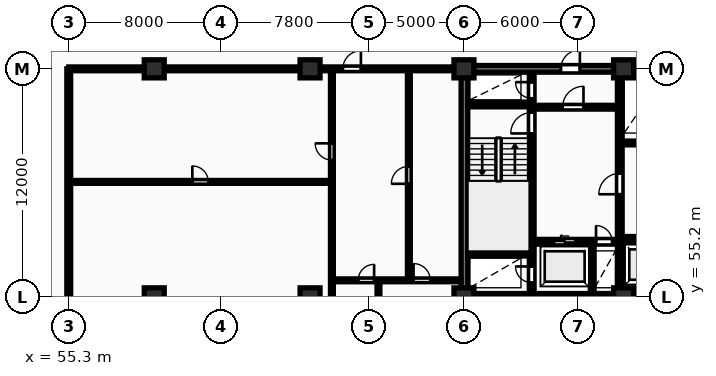
"""IFC4 building model, lengths in metres.
Left out: names, types, materials, properties, quantities, classifications, styles, units other than length and angle.
Written with IfcOpenShell. Run it as: python <this file> out.ifc"""

import sys

from ifc_helpers import new_model, si_unit, direction, frame, frame_2d, origin, origin_2d, place, context, subcontext, project, spatial, rectangle, extrude, element, fill, save


model = new_model("IFC4")
c1 = context("Model", 3, precision=1e-05, world=origin(), true_north=direction((0.0, 1.0)))
c2 = subcontext(c1, "Body", "Model", "MODEL_VIEW")
j1 = project(units=[si_unit("LENGTHUNIT", "METRE"), si_unit("PLANEANGLEUNIT", "RADIAN")], contexts=[c1])
p1 = place(None, origin())
s1 = spatial("IfcSite", under=j1, at=p1, CompositionType="ELEMENT")
p2 = place(p1, origin())
s2 = spatial("IfcBuilding", under=s1, at=p2, CompositionType="ELEMENT")
p3 = place(p2, frame((0.0, 0.0, 24.0)))
s3 = spatial("IfcBuildingStorey", under=s2, at=p3, CompositionType="ELEMENT", Elevation=24.0)
for number, where, z_axis, x_axis in (
    (1, (59.8, 55.2, 0.0), (0.0, 0.0, 1.0), (1.0, 0.0, 0.0)),
    (2, (59.8, 67.2, 0.0), (0.0, 0.0, 1.0), (1.0, 0.0, 0.0)),
    (3, (68.0, 55.2, 0.0), (0.0, 0.0, 1.0), (1.0, 0.0, 0.0)),
    (4, (68.0, 67.2, 0.0), (0.0, 0.0, 1.0), (1.0, 0.0, 0.0)),
    (5, (76.1, 55.2, 0.0), (0.0, 0.0, 1.0), (1.0, 0.0, 0.0)),
    (6, (76.1, 67.2, 0.0), (0.0, 0.0, 1.0), (1.0, 0.0, 0.0)),
    (7, (84.5, 55.2, 0.0), (0.0, 0.0, 1.0), (1.0, 0.0, 0.0)),
    (8, (84.5, 67.2, 0.0), (0.0, 0.0, 1.0), (1.0, 0.0, 0.0)),
):
    element("IfcColumn", number, at=place(p3, frame(where, z_axis=z_axis, x_axis=x_axis)), inside=s3, PredefinedType="COLUMN", context=c2, shape_type="SweptSolid", body=[
        extrude(rectangle(XDim=1.05, YDim=0.95, at=origin_2d()), origin(), (0.0, 0.0, 1.0), 3.25),
    ])
p4 = place(p3, frame((75.95, 55.2, 0.0), z_axis=(0.0, 0.0, 1.0), x_axis=(1.0, 0.0, 0.0)))
e9 = element("IfcWall", 9, at=p4, inside=s3, PredefinedType="SHEAR", context=c2, shape_type="SweptSolid", body=[
    extrude(rectangle(XDim=36.3, YDim=0.35, at=frame_2d((18.15, 0.0))), origin(), (0.0, 0.0, 1.0), 3.25),
])
p5 = place(p3, frame((76.125, 55.375, 0.0), z_axis=(0.0, 0.0, 1.0), x_axis=(0.0, 1.0, 0.0)))
e10 = element("IfcWall", 10, at=p5, inside=s3, PredefinedType="SHEAR", context=c2, shape_type="SweptSolid", body=[
    extrude(rectangle(XDim=11.65, YDim=0.35, at=frame_2d((5.825, 0.0))), origin(), (0.0, 0.0, 1.0), 3.25),
])
p6 = place(p3, frame((75.95, 67.2, 0.0), z_axis=(0.0, 0.0, 1.0), x_axis=(1.0, 0.0, 0.0)))
e11 = element("IfcWall", 11, at=p6, inside=s3, PredefinedType="SHEAR", context=c2, shape_type="SweptSolid", body=[
    extrude(rectangle(XDim=36.3, YDim=0.35, at=frame_2d((18.15, 0.0))), origin(), (0.0, 0.0, 1.0), 3.25),
])
p7 = place(p6, frame((5.25, 0.0, 0.0)))
e12 = element("IfcOpeningElement", 12, at=p7, cuts=e11, PredefinedType="OPENING", context=c2, shape_type="SweptSolid", body=[
    extrude(rectangle(XDim=1.0, YDim=2.15, at=frame_2d((0.5, 1.075))), frame((0.0, 0.185, 0.0), z_axis=(0.0, -1.0, 0.0), x_axis=(1.0, 0.0, 0.0)), (0.0, 0.0, 1.0), 0.37),
])
p8 = place(p6, frame((21.6, 0.0, 0.0)))
e13 = element("IfcOpeningElement", 13, at=p8, cuts=e11, PredefinedType="OPENING", context=c2, shape_type="SweptSolid", body=[
    extrude(rectangle(XDim=1.5, YDim=2.2, at=frame_2d((0.75, 1.1))), frame((0.0, 0.185, 0.0), z_axis=(0.0, -1.0, 0.0), x_axis=(1.0, 0.0, 0.0)), (0.0, 0.0, 1.0), 0.37),
])
p9 = place(p6, frame((30.45, 0.0, 0.0)))
e14 = element("IfcOpeningElement", 14, at=p9, cuts=e11, PredefinedType="OPENING", context=c2, shape_type="SweptSolid", body=[
    extrude(rectangle(XDim=1.0, YDim=2.15, at=frame_2d((0.5, 1.075))), frame((0.0, 0.185, 0.0), z_axis=(0.0, -1.0, 0.0), x_axis=(1.0, 0.0, 0.0)), (0.0, 0.0, 1.0), 0.37),
])
p10 = place(p3, frame((79.665, 55.4, 0.0), z_axis=(0.0, 0.0, 1.0), x_axis=(0.0, 1.0, 0.0)))
e15 = element("IfcWall", 15, at=p10, inside=s3, PredefinedType="SHEAR", context=c2, shape_type="SweptSolid", body=[
    extrude(rectangle(XDim=11.6, YDim=0.25, at=frame_2d((5.8, 0.0))), origin(), (0.0, 0.0, 1.0), 3.25),
])
p11 = place(p10, frame((0.55, 0.0, 0.0)))
e16 = element("IfcOpeningElement", 16, at=p11, cuts=e15, PredefinedType="OPENING", context=c2, shape_type="SweptSolid", body=[
    extrude(rectangle(XDim=0.85, YDim=2.05, at=frame_2d((0.425, 1.025))), frame((0.0, 0.135, 0.0), z_axis=(0.0, -1.0, 0.0), x_axis=(1.0, 0.0, 0.0)), (0.0, 0.0, 1.0), 0.27),
])
p12 = place(p10, frame((8.4, 0.0, 0.0)))
e17 = element("IfcOpeningElement", 17, at=p12, cuts=e15, PredefinedType="OPENING", context=c2, shape_type="SweptSolid", body=[
    extrude(rectangle(XDim=1.1, YDim=2.1, at=frame_2d((0.55, 1.05))), frame((0.0, 0.135, 0.0), z_axis=(0.0, -1.0, 0.0), x_axis=(1.0, 0.0, 0.0)), (0.0, 0.0, 1.0), 0.27),
])
p13 = place(p10, frame((10.25, 0.0, 0.0)))
e18 = element("IfcOpeningElement", 18, at=p13, cuts=e15, PredefinedType="OPENING", context=c2, shape_type="SweptSolid", body=[
    extrude(rectangle(XDim=0.85, YDim=2.05, at=frame_2d((0.425, 1.025))), frame((0.0, 0.135, 0.0), z_axis=(0.0, -1.0, 0.0), x_axis=(1.0, 0.0, 0.0)), (0.0, 0.0, 1.0), 0.27),
])
for number, where, z_axis, x_axis in (
    (19, (76.3, 57.475, 0.0), (0.0, 0.0, 1.0), (1.0, 0.0, 0.0)),
    (20, (76.3, 65.325, 0.0), (0.0, 0.0, 1.0), (1.0, 0.0, 0.0)),
):
    element("IfcWall", number, at=place(p3, frame(where, z_axis=z_axis, x_axis=x_axis)), inside=s3, PredefinedType="SHEAR", context=c2, shape_type="SweptSolid", body=[
        extrude(rectangle(XDim=3.24, YDim=0.25, at=frame_2d((1.62, 0.0))), origin(), (0.0, 0.0, 1.0), 3.25),
    ])
p14 = place(p3, frame((79.79, 58.1, 0.0), z_axis=(0.0, 0.0, 1.0), x_axis=(1.0, 0.0, 0.0)))
e21 = element("IfcWall", 21, at=p14, inside=s3, PredefinedType="SHEAR", context=c2, shape_type="SweptSolid", body=[
    extrude(rectangle(XDim=4.39, YDim=0.25, at=frame_2d((2.195, 0.0))), origin(), (0.0, 0.0, 1.0), 3.25),
])
p15 = place(p14, frame((1.05, 0.0, 0.0)))
e22 = element("IfcOpeningElement", 22, at=p15, cuts=e21, PredefinedType="OPENING", context=c2, shape_type="SweptSolid", body=[
    extrude(rectangle(XDim=1.12, YDim=2.12, at=frame_2d((0.56, 1.06))), frame((0.0, 0.135, 0.0), z_axis=(0.0, -1.0, 0.0), x_axis=(1.0, 0.0, 0.0)), (0.0, 0.0, 1.0), 0.27),
])
p16 = place(p14, frame((3.26, 0.0, 0.0)))
e23 = element("IfcOpeningElement", 23, at=p16, cuts=e21, PredefinedType="OPENING", context=c2, shape_type="SweptSolid", body=[
    extrude(rectangle(XDim=0.85, YDim=2.05, at=frame_2d((0.425, 1.025))), frame((0.0, 0.135, 0.0), z_axis=(0.0, -1.0, 0.0), x_axis=(1.0, 0.0, 0.0)), (0.0, 0.0, 1.0), 0.27),
])
p17 = place(p3, frame((82.85, 55.4, 0.0), z_axis=(0.0, 0.0, 1.0), x_axis=(0.0, 1.0, 0.0)))
e24 = element("IfcWall", 24, at=p17, inside=s3, PredefinedType="PARTITIONING", context=c2, shape_type="SweptSolid", body=[
    extrude(rectangle(XDim=2.56, YDim=0.2, at=frame_2d((1.28, 0.0))), origin(), (0.0, 0.0, 1.0), 2.97),
])
p18 = place(p3, frame((79.79, 65.18, 0.0), z_axis=(0.0, 0.0, 1.0), x_axis=(1.0, 0.0, 0.0)))
e25 = element("IfcWall", 25, at=p18, inside=s3, PredefinedType="PARTITIONING", context=c2, shape_type="SweptSolid", body=[
    extrude(rectangle(XDim=4.39, YDim=0.2, at=frame_2d((2.195, 0.0))), origin(), (0.0, 0.0, 1.0), 2.97),
])
p19 = place(p18, frame((1.5, 0.0, 0.0)))
e26 = element("IfcOpeningElement", 26, at=p19, cuts=e25, PredefinedType="OPENING", context=c2, shape_type="SweptSolid", body=[
    extrude(rectangle(XDim=1.1, YDim=2.1, at=frame_2d((0.55, 1.05))), frame((0.0, 0.11, 0.0), z_axis=(0.0, -1.0, 0.0), x_axis=(1.0, 0.0, 0.0)), (0.0, 0.0, 1.0), 0.22),
])
p20 = place(p3, frame((84.3, 55.4, 0.0), z_axis=(0.0, 0.0, 1.0), x_axis=(0.0, 1.0, 0.0)))
e27 = element("IfcWall", 27, at=p20, inside=s3, PredefinedType="SHEAR", context=c2, shape_type="SweptSolid", body=[
    extrude(rectangle(XDim=11.6, YDim=0.25, at=frame_2d((5.8, 0.0))), origin(), (0.0, 0.0, 1.0), 3.25),
])
p21 = place(p20, frame((5.2, 0.0, 0.0)))
e28 = element("IfcOpeningElement", 28, at=p21, cuts=e27, PredefinedType="OPENING", context=c2, shape_type="SweptSolid", body=[
    extrude(rectangle(XDim=1.1, YDim=2.1, at=frame_2d((0.55, 1.05))), frame((0.0, 0.135, 0.0), z_axis=(0.0, -1.0, 0.0), x_axis=(1.0, 0.0, 0.0)), (0.0, 0.0, 1.0), 0.27),
])
p22 = place(p3, frame((84.42, 58.25, 0.0), z_axis=(0.0, 0.0, 1.0), x_axis=(1.0, 0.0, 0.0)))
e29 = element("IfcWall", 29, at=p22, inside=s3, PredefinedType="SHEAR", context=c2, shape_type="SweptSolid", body=[
    extrude(rectangle(XDim=8.36, YDim=0.25, at=frame_2d((4.18, 0.0))), origin(), (0.0, 0.0, 1.0), 3.25),
])
p23 = place(p22, frame((0.82, 0.0, 0.0)))
e30 = element("IfcOpeningElement", 30, at=p23, cuts=e29, PredefinedType="OPENING", context=c2, shape_type="SweptSolid", body=[
    extrude(rectangle(XDim=1.12, YDim=2.12, at=frame_2d((0.56, 1.06))), frame((0.0, 0.135, 0.0), z_axis=(0.0, -1.0, 0.0), x_axis=(1.0, 0.0, 0.0)), (0.0, 0.0, 1.0), 0.27),
])
p24 = place(p22, frame((3.62, 0.0, 0.0)))
e31 = element("IfcOpeningElement", 31, at=p24, cuts=e29, PredefinedType="OPENING", context=c2, shape_type="SweptSolid", body=[
    extrude(rectangle(XDim=1.12, YDim=2.12, at=frame_2d((0.56, 1.06))), frame((0.0, 0.135, 0.0), z_axis=(0.0, -1.0, 0.0), x_axis=(1.0, 0.0, 0.0)), (0.0, 0.0, 1.0), 0.27),
])
p25 = place(p22, frame((6.42, 0.0, 0.0)))
e32 = element("IfcOpeningElement", 32, at=p25, cuts=e29, PredefinedType="OPENING", context=c2, shape_type="SweptSolid", body=[
    extrude(rectangle(XDim=1.12, YDim=2.12, at=frame_2d((0.56, 1.06))), frame((0.0, 0.135, 0.0), z_axis=(0.0, -1.0, 0.0), x_axis=(1.0, 0.0, 0.0)), (0.0, 0.0, 1.0), 0.27),
])
p26 = place(p3, frame((84.42, 63.3, 0.0), z_axis=(0.0, 0.0, 1.0), x_axis=(1.0, 0.0, 0.0)))
e33 = element("IfcWall", 33, at=p26, inside=s3, PredefinedType="PARTITIONING", context=c2, shape_type="SweptSolid", body=[
    extrude(rectangle(XDim=19.83, YDim=0.2, at=frame_2d((9.915, 0.0))), origin(), (0.0, 0.0, 1.0), 2.97),
])
p27 = place(p26, frame((1.15, 0.0, 0.0)))
e34 = element("IfcOpeningElement", 34, at=p27, cuts=e33, PredefinedType="OPENING", context=c2, shape_type="SweptSolid", body=[
    extrude(rectangle(XDim=0.85, YDim=2.05, at=frame_2d((0.425, 1.025))), frame((0.0, 0.11, 0.0), z_axis=(0.0, -1.0, 0.0), x_axis=(1.0, 0.0, 0.0)), (0.0, 0.0, 1.0), 0.22),
])
p28 = place(p26, frame((3.25, 0.0, 0.0)))
e35 = element("IfcOpeningElement", 35, at=p28, cuts=e33, PredefinedType="OPENING", context=c2, shape_type="SweptSolid", body=[
    extrude(rectangle(XDim=0.85, YDim=2.05, at=frame_2d((0.425, 1.025))), frame((0.0, 0.11, 0.0), z_axis=(0.0, -1.0, 0.0), x_axis=(1.0, 0.0, 0.0)), (0.0, 0.0, 1.0), 0.22),
])
p29 = place(p26, frame((13.08, 0.0, 0.0)))
e36 = element("IfcOpeningElement", 36, at=p29, cuts=e33, PredefinedType="OPENING", context=c2, shape_type="SweptSolid", body=[
    extrude(rectangle(XDim=1.5, YDim=2.2, at=frame_2d((0.75, 1.1))), frame((0.0, 0.11, 0.0), z_axis=(0.0, -1.0, 0.0), x_axis=(1.0, 0.0, 0.0)), (0.0, 0.0, 1.0), 0.22),
])
p30 = place(p26, frame((6.68, 0.0, 0.0)))
e37 = element("IfcOpeningElement", 37, at=p30, cuts=e33, PredefinedType="OPENING", context=c2, shape_type="SweptSolid", body=[
    extrude(rectangle(XDim=0.92, YDim=2.08, at=frame_2d((0.46, 1.04))), frame((0.0, 0.11, 0.0), z_axis=(0.0, -1.0, 0.0), x_axis=(1.0, 0.0, 0.0)), (0.0, 0.0, 1.0), 0.22),
])
p31 = place(p26, frame((16.33, 0.0, 0.0)))
e38 = element("IfcOpeningElement", 38, at=p31, cuts=e33, PredefinedType="OPENING", context=c2, shape_type="SweptSolid", body=[
    extrude(rectangle(XDim=0.88, YDim=2.06, at=frame_2d((0.44, 1.03))), frame((0.0, 0.11, 0.0), z_axis=(0.0, -1.0, 0.0), x_axis=(1.0, 0.0, 0.0)), (0.0, 0.0, 1.0), 0.22),
])
p32 = place(p3, frame((55.3, 51.1, 0.0), z_axis=(0.0, 0.0, 1.0), x_axis=(0.0, 1.0, 0.0)))
e39 = element("IfcWall", 39, at=p32, inside=s3, PredefinedType="PARTITIONING", context=c2, shape_type="SweptSolid", body=[
    extrude(rectangle(XDim=16.1, YDim=0.2, at=frame_2d((8.05, 0.0))), origin(), (0.0, 0.0, 1.0), 2.97),
])
p33 = place(p3, frame((55.3, 61.25, 0.0), z_axis=(0.0, 0.0, 1.0), x_axis=(1.0, 0.0, 0.0)))
e40 = element("IfcWall", 40, at=p33, inside=s3, PredefinedType="PARTITIONING", context=c2, shape_type="SweptSolid", body=[
    extrude(rectangle(XDim=13.85, YDim=0.15, at=frame_2d((6.925, 0.0))), origin(), (0.0, 0.0, 1.0), 2.97),
])
p34 = place(p33, frame((6.505, 0.0, 0.0)))
e41 = element("IfcOpeningElement", 41, at=p34, cuts=e40, PredefinedType="OPENING", context=c2, shape_type="SweptSolid", body=[
    extrude(rectangle(XDim=0.84, YDim=2.04, at=frame_2d((0.42, 1.02))), frame((0.0, 0.085, 0.0), z_axis=(0.0, -1.0, 0.0), x_axis=(1.0, 0.0, 0.0)), (0.0, 0.0, 1.0), 0.17),
])
p35 = place(p3, frame((69.15, 51.1, 0.0), z_axis=(0.0, 0.0, 1.0), x_axis=(0.0, 1.0, 0.0)))
e42 = element("IfcWall", 42, at=p35, inside=s3, PredefinedType="PARTITIONING", context=c2, shape_type="SweptSolid", body=[
    extrude(rectangle(XDim=16.05, YDim=0.15, at=frame_2d((8.025, 0.0))), origin(), (0.0, 0.0, 1.0), 2.97),
])
p36 = place(p35, frame((11.3, 0.0, 0.0)))
e43 = element("IfcOpeningElement", 43, at=p36, cuts=e42, PredefinedType="OPENING", context=c2, shape_type="SweptSolid", body=[
    extrude(rectangle(XDim=0.88, YDim=2.06, at=frame_2d((0.44, 1.03))), frame((0.0, 0.085, 0.0), z_axis=(0.0, -1.0, 0.0), x_axis=(1.0, 0.0, 0.0)), (0.0, 0.0, 1.0), 0.17),
])
p37 = place(p3, frame((73.2, 56.07, 0.0), z_axis=(0.0, 0.0, 1.0), x_axis=(0.0, 1.0, 0.0)))
e44 = element("IfcWall", 44, at=p37, inside=s3, PredefinedType="PARTITIONING", context=c2, shape_type="SweptSolid", body=[
    extrude(rectangle(XDim=11.08, YDim=0.15, at=frame_2d((5.54, 0.0))), origin(), (0.0, 0.0, 1.0), 2.97),
])
p38 = place(p37, frame((5.08, 0.0, 0.0)))
e45 = element("IfcOpeningElement", 45, at=p38, cuts=e44, PredefinedType="OPENING", context=c2, shape_type="SweptSolid", body=[
    extrude(rectangle(XDim=0.92, YDim=2.08, at=frame_2d((0.46, 1.04))), frame((0.0, 0.085, 0.0), z_axis=(0.0, -1.0, 0.0), x_axis=(1.0, 0.0, 0.0)), (0.0, 0.0, 1.0), 0.17),
])
p39 = place(p3, frame((71.6, 51.1, 0.0), z_axis=(0.0, 0.0, 1.0), x_axis=(0.0, 1.0, 0.0)))
e46 = element("IfcWall", 46, at=p39, inside=s3, PredefinedType="PARTITIONING", context=c2, shape_type="SweptSolid", body=[
    extrude(rectangle(XDim=4.97, YDim=0.15, at=frame_2d((2.485, 0.0))), origin(), (0.0, 0.0, 1.0), 2.97),
])
p40 = place(p3, frame((69.17, 56.07, 0.0), z_axis=(0.0, 0.0, 1.0), x_axis=(1.0, 0.0, 0.0)))
e47 = element("IfcWall", 47, at=p40, inside=s3, PredefinedType="PARTITIONING", context=c2, shape_type="SweptSolid", body=[
    extrude(rectangle(XDim=6.76, YDim=0.15, at=frame_2d((3.38, 0.0))), origin(), (0.0, 0.0, 1.0), 2.97),
])
p41 = place(p40, frame((1.362, 0.0, 0.0)))
e48 = element("IfcOpeningElement", 48, at=p41, cuts=e47, PredefinedType="OPENING", context=c2, shape_type="SweptSolid", body=[
    extrude(rectangle(XDim=0.84, YDim=2.04, at=frame_2d((0.42, 1.02))), frame((0.0, 0.085, 0.0), z_axis=(0.0, -1.0, 0.0), x_axis=(1.0, 0.0, 0.0)), (0.0, 0.0, 1.0), 0.17),
])
p42 = place(p40, frame((4.277, 0.0, 0.0)))
e49 = element("IfcOpeningElement", 49, at=p42, cuts=e47, PredefinedType="OPENING", context=c2, shape_type="SweptSolid", body=[
    extrude(rectangle(XDim=0.88, YDim=2.06, at=frame_2d((0.44, 1.03))), frame((0.0, 0.085, 0.0), z_axis=(0.0, -1.0, 0.0), x_axis=(1.0, 0.0, 0.0)), (0.0, 0.0, 1.0), 0.17),
])
p43 = place(p3, frame((55.3, 67.2, 0.0), z_axis=(0.0, 0.0, 1.0), x_axis=(1.0, 0.0, 0.0)))
e50 = element("IfcWall", 50, at=p43, inside=s3, PredefinedType="PARTITIONING", context=c2, shape_type="SweptSolid", body=[
    extrude(rectangle(XDim=20.65, YDim=0.2, at=frame_2d((10.325, 0.0))), origin(), (0.0, 0.0, 1.0), 2.37),
])
p44 = place(p43, frame((14.426, 0.0, 0.0)))
e51 = element("IfcOpeningElement", 51, at=p44, cuts=e50, PredefinedType="OPENING", context=c2, shape_type="SweptSolid", body=[
    extrude(rectangle(XDim=0.95, YDim=2.15, at=frame_2d((0.475, 1.075))), frame((0.0, 0.11, 0.0), z_axis=(0.0, -1.0, 0.0), x_axis=(1.0, 0.0, 0.0)), (0.0, 0.0, 1.0), 0.22),
])
p45 = place(p7, origin())
e52 = element("IfcDoor", 52, at=p45, inside=s3, OperationType="SINGLE_SWING_RIGHT", PredefinedType="DOOR", context=c2, shape_type="SweptSolid", body=[
    extrude(rectangle(XDim=1.0, YDim=2.15, at=frame_2d((0.5, 1.075))), frame((0.0, 0.025, 0.0), z_axis=(0.0, -1.0, 0.0), x_axis=(1.0, 0.0, 0.0)), (0.0, 0.0, 1.0), 0.05),
])
fill(e12, e52)
p46 = place(p11, origin())
e53 = element("IfcDoor", 53, at=p46, inside=s3, OperationType="SINGLE_SWING_RIGHT", PredefinedType="DOOR", context=c2, shape_type="SweptSolid", body=[
    extrude(rectangle(XDim=0.85, YDim=2.05, at=frame_2d((0.425, 1.025))), frame((0.0, 0.025, 0.0), z_axis=(0.0, -1.0, 0.0), x_axis=(1.0, 0.0, 0.0)), (0.0, 0.0, 1.0), 0.05),
])
fill(e16, e53)
p47 = place(p12, origin())
e54 = element("IfcDoor", 54, at=p47, inside=s3, OperationType="SINGLE_SWING_LEFT", PredefinedType="DOOR", context=c2, shape_type="SweptSolid", body=[
    extrude(rectangle(XDim=1.1, YDim=2.1, at=frame_2d((0.55, 1.05))), frame((0.0, 0.025, 0.0), z_axis=(0.0, -1.0, 0.0), x_axis=(1.0, 0.0, 0.0)), (0.0, 0.0, 1.0), 0.05),
])
fill(e17, e54)
p48 = place(p13, origin())
e55 = element("IfcDoor", 55, at=p48, inside=s3, OperationType="SINGLE_SWING_RIGHT", PredefinedType="DOOR", context=c2, shape_type="SweptSolid", body=[
    extrude(rectangle(XDim=0.85, YDim=2.05, at=frame_2d((0.425, 1.025))), frame((0.0, 0.025, 0.0), z_axis=(0.0, -1.0, 0.0), x_axis=(1.0, 0.0, 0.0)), (0.0, 0.0, 1.0), 0.05),
])
fill(e18, e55)
p49 = place(p15, origin())
e56 = element("IfcDoor", 56, at=p49, inside=s3, OperationType="SLIDING_TO_LEFT", PredefinedType="DOOR", context=c2, shape_type="SweptSolid", body=[
    extrude(rectangle(XDim=1.12, YDim=2.12, at=frame_2d((0.56, 1.06))), frame((0.0, 0.025, 0.0), z_axis=(0.0, -1.0, 0.0), x_axis=(1.0, 0.0, 0.0)), (0.0, 0.0, 1.0), 0.05),
])
fill(e22, e56)
p50 = place(p16, origin())
e57 = element("IfcDoor", 57, at=p50, inside=s3, OperationType="SINGLE_SWING_LEFT", PredefinedType="DOOR", context=c2, shape_type="SweptSolid", body=[
    extrude(rectangle(XDim=0.85, YDim=2.05, at=frame_2d((0.425, 1.025))), frame((0.0, 0.025, 0.0), z_axis=(0.0, -1.0, 0.0), x_axis=(1.0, 0.0, 0.0)), (0.0, 0.0, 1.0), 0.05),
])
fill(e23, e57)
p51 = place(p19, origin())
e58 = element("IfcDoor", 58, at=p51, inside=s3, OperationType="SINGLE_SWING_RIGHT", PredefinedType="DOOR", context=c2, shape_type="SweptSolid", body=[
    extrude(rectangle(XDim=1.1, YDim=2.1, at=frame_2d((0.55, 1.05))), frame((0.0, 0.025, 0.0), z_axis=(0.0, -1.0, 0.0), x_axis=(1.0, 0.0, 0.0)), (0.0, 0.0, 1.0), 0.05),
])
fill(e26, e58)
p52 = place(p21, origin())
e59 = element("IfcDoor", 59, at=p52, inside=s3, OperationType="SINGLE_SWING_LEFT", PredefinedType="DOOR", context=c2, shape_type="SweptSolid", body=[
    extrude(rectangle(XDim=1.1, YDim=2.1, at=frame_2d((0.55, 1.05))), frame((0.0, 0.025, 0.0), z_axis=(0.0, -1.0, 0.0), x_axis=(1.0, 0.0, 0.0)), (0.0, 0.0, 1.0), 0.05),
])
fill(e28, e59)
p53 = place(p34, origin())
e60 = element("IfcDoor", 60, at=p53, inside=s3, OperationType="SINGLE_SWING_LEFT", PredefinedType="DOOR", context=c2, shape_type="SweptSolid", body=[
    extrude(rectangle(XDim=0.84, YDim=2.04, at=frame_2d((0.42, 1.02))), frame((0.0, 0.025, 0.0), z_axis=(0.0, -1.0, 0.0), x_axis=(1.0, 0.0, 0.0)), (0.0, 0.0, 1.0), 0.05),
])
fill(e41, e60)
p54 = place(p36, origin())
e61 = element("IfcDoor", 61, at=p54, inside=s3, OperationType="SINGLE_SWING_RIGHT", PredefinedType="DOOR", context=c2, shape_type="SweptSolid", body=[
    extrude(rectangle(XDim=0.88, YDim=2.06, at=frame_2d((0.44, 1.03))), frame((0.0, 0.025, 0.0), z_axis=(0.0, -1.0, 0.0), x_axis=(1.0, 0.0, 0.0)), (0.0, 0.0, 1.0), 0.05),
])
fill(e43, e61)
p55 = place(p38, origin())
e62 = element("IfcDoor", 62, at=p55, inside=s3, OperationType="SINGLE_SWING_LEFT", PredefinedType="DOOR", context=c2, shape_type="SweptSolid", body=[
    extrude(rectangle(XDim=0.92, YDim=2.08, at=frame_2d((0.46, 1.04))), frame((0.0, 0.025, 0.0), z_axis=(0.0, -1.0, 0.0), x_axis=(1.0, 0.0, 0.0)), (0.0, 0.0, 1.0), 0.05),
])
fill(e45, e62)
p56 = place(p41, origin())
e63 = element("IfcDoor", 63, at=p56, inside=s3, OperationType="SINGLE_SWING_RIGHT", PredefinedType="DOOR", context=c2, shape_type="SweptSolid", body=[
    extrude(rectangle(XDim=0.84, YDim=2.04, at=frame_2d((0.42, 1.02))), frame((0.0, 0.025, 0.0), z_axis=(0.0, -1.0, 0.0), x_axis=(1.0, 0.0, 0.0)), (0.0, 0.0, 1.0), 0.05),
])
fill(e48, e63)
p57 = place(p42, origin())
e64 = element("IfcDoor", 64, at=p57, inside=s3, OperationType="SINGLE_SWING_LEFT", PredefinedType="DOOR", context=c2, shape_type="SweptSolid", body=[
    extrude(rectangle(XDim=0.88, YDim=2.06, at=frame_2d((0.44, 1.03))), frame((0.0, 0.025, 0.0), z_axis=(0.0, -1.0, 0.0), x_axis=(1.0, 0.0, 0.0)), (0.0, 0.0, 1.0), 0.05),
])
fill(e49, e64)
p58 = place(p44, origin())
e65 = element("IfcDoor", 65, at=p58, inside=s3, OperationType="SINGLE_SWING_RIGHT", PredefinedType="DOOR", context=c2, shape_type="SweptSolid", body=[
    extrude(rectangle(XDim=0.95, YDim=2.15, at=frame_2d((0.475, 1.075))), frame((0.0, 0.025, 0.0), z_axis=(0.0, -1.0, 0.0), x_axis=(1.0, 0.0, 0.0)), (0.0, 0.0, 1.0), 0.05),
])
fill(e51, e65)
save(model, sys.argv[1])
